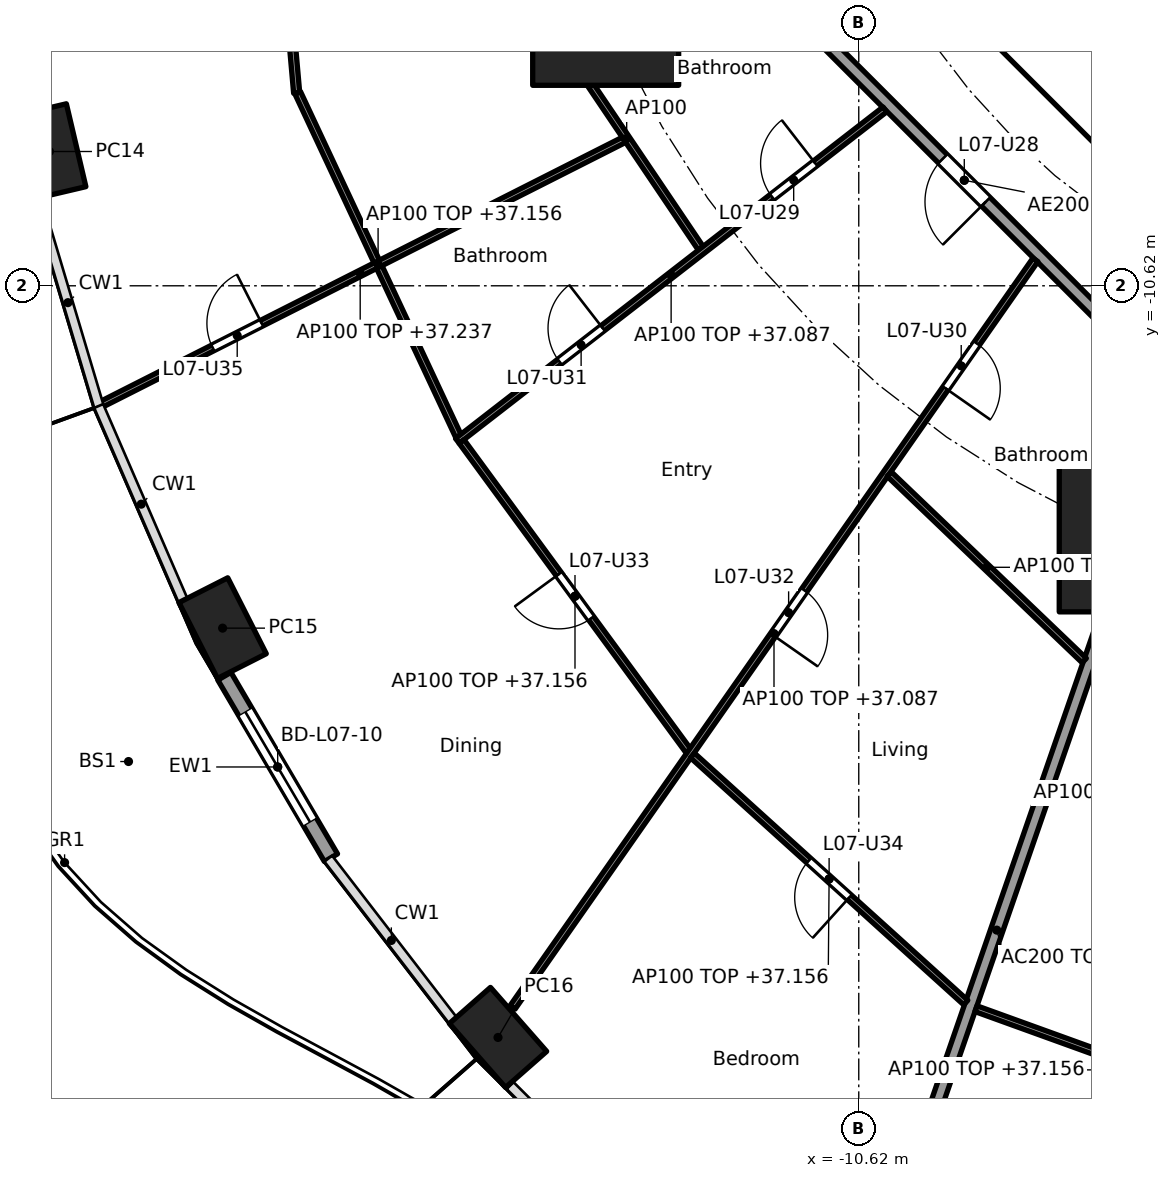
"""IFC4 building model, lengths in metres.
Left out: names, types, materials, properties, quantities, classifications, styles, units other than length and angle.
Written with IfcOpenShell. Run it as: python <this file> out.ifc"""

import sys

from ifc_helpers import new_model, si_unit, direction, frame, frame_2d, origin, origin_2d, place, context, subcontext, project, spatial, rectangle, hollow_rectangle, extrude, element, fill, save


model = new_model("IFC4")
c1 = context("Model", 3, precision=1e-05, world=origin(), true_north=direction((0.0, 1.0)))
c2 = subcontext(c1, "Body", "Model", "MODEL_VIEW")
j1 = project(units=[si_unit("LENGTHUNIT", "METRE"), si_unit("PLANEANGLEUNIT", "RADIAN")], contexts=[c1])
p1 = place(None, origin())
s1 = spatial("IfcSite", under=j1, at=p1, CompositionType="ELEMENT")
p2 = place(p1, origin())
s2 = spatial("IfcBuilding", under=s1, at=p2, CompositionType="ELEMENT")
p3 = place(p2, frame((0.0, 0.0, 34.4)))
s3 = spatial("IfcBuildingStorey", under=s2, at=p3, CompositionType="ELEMENT", Elevation=34.4)
for number, where, z_axis, x_axis in (
    (1, (-23.929, -8.412, 0.0), (0.0, 0.0, 1.0), (0.229, -0.973, 0.0)),
    (2, (-21.082, -16.25, 0.0), (0.0, 0.0, 1.0), (0.452, -0.892, 0.0)),
    (3, (-16.552, -22.981, 0.0), (0.0, 0.0, 1.0), (0.66, -0.751, 0.0)),
):
    element("IfcColumn", number, at=place(p3, frame(where, z_axis=z_axis, x_axis=x_axis)), inside=s3, PredefinedType="COLUMN", context=c2, shape_type="SweptSolid", body=[
        extrude(hollow_rectangle(XDim=1.4, YDim=0.9, WallThickness=0.05, at=origin_2d()), origin(), (0.0, 0.0, 1.0), 3.7),
    ])
for number, where, z_axis, x_axis in (
    (4, (-14.782, -6.123, 0.0), (0.0, 0.0, 1.0), (1.0, 0.0, 0.0)),
    (5, (-6.123, -14.782, 0.0), (0.0, 0.0, 1.0), (1.0, 0.0, 0.0)),
):
    element("IfcColumn", number, at=place(p3, frame(where, z_axis=z_axis, x_axis=x_axis)), inside=s3, PredefinedType="COLUMN", context=c2, shape_type="SweptSolid", body=[
        extrude(rectangle(XDim=2.4, YDim=2.4, at=origin_2d()), origin(), (0.0, 0.0, 1.0), 3.7),
    ])
p4 = place(p3, frame((-19.3, -20.026, 0.0), z_axis=(0.0, 0.0, 1.0), x_axis=(-0.506311160839, 0.862350861546, 0.0)))
e6 = element("IfcWall", 6, at=p4, inside=s3, PredefinedType="SOLIDWALL", context=c2, shape_type="SweptSolid", body=[
    extrude(rectangle(XDim=3.462, YDim=0.25, at=frame_2d((1.731, 0.0))), origin(), (0.0, 0.0, 1.0), 3.44),
])
p5 = place(p4, frame((0.681, 0.0, 0.0)))
e7 = element("IfcOpeningElement", 7, at=p5, cuts=e6, PredefinedType="OPENING", context=c2, shape_type="SweptSolid", body=[
    extrude(rectangle(XDim=2.1, YDim=2.4, at=frame_2d((1.05, 1.2))), frame((0.0, 0.135, 0.0), z_axis=(0.0, -1.0, 0.0), x_axis=(1.0, 0.0, 0.0)), (0.0, 0.0, 1.0), 0.27),
])
p6 = place(p3, frame((-9.988, -4.613, 0.0), z_axis=(0.0, 0.0, 1.0), x_axis=(0.707106781187, -0.707106781187, 0.0)))
e8 = element("IfcWall", 8, at=p6, inside=s3, PredefinedType="SHEAR", context=c2, shape_type="SweptSolid", body=[
    extrude(rectangle(XDim=7.602, YDim=0.6, at=frame_2d((3.801, 0.0))), origin(), (0.0, 0.0, 1.0), 3.44),
])
p7 = place(p6, frame((6.151, 0.0, 0.0)))
e9 = element("IfcOpeningElement", 9, at=p7, cuts=e8, PredefinedType="OPENING", context=c2, shape_type="SweptSolid", body=[
    extrude(rectangle(XDim=1.1, YDim=2.1, at=frame_2d((0.55, 1.05))), frame((0.0, 0.31, 0.0), z_axis=(0.0, -1.0, 0.0), x_axis=(1.0, 0.0, 0.0)), (0.0, 0.0, 1.0), 0.62),
])
p8 = place(p3, frame((-6.139, -14.829, 0.0), z_axis=(0.0, 0.0, 1.0), x_axis=(-0.327178799566, -0.944962450637, 0.0)))
e10 = element("IfcWall", 10, at=p8, inside=s3, PredefinedType="PARTITIONING", context=c2, shape_type="SweptSolid", body=[
    extrude(rectangle(XDim=13.517, YDim=0.2, at=frame_2d((6.759, 0.0))), origin(), (0.0, 0.0, 1.0), 2.756),
])
p9 = place(p3, frame((-12.635, -5.134, 0.0), z_axis=(0.0, 0.0, 1.0), x_axis=(0.707106781187, -0.707106781187, 0.0)))
e11 = element("IfcWall", 11, at=p9, inside=s3, PredefinedType="PARTITIONING", context=c2, shape_type="SweptSolid", body=[
    extrude(rectangle(XDim=10.609, YDim=0.2, at=frame_2d((5.305, 0.0))), origin(), (0.0, 0.0, 1.0), 3.44),
])
p10 = place(p9, frame((4.804, 0.0, 0.0)))
e12 = element("IfcOpeningElement", 12, at=p10, cuts=e11, PredefinedType="OPENING", context=c2, shape_type="SweptSolid", body=[
    extrude(rectangle(XDim=1.0, YDim=2.1, at=frame_2d((0.5, 1.05))), frame((0.0, 0.11, 0.0), z_axis=(0.0, -1.0, 0.0), x_axis=(1.0, 0.0, 0.0)), (0.0, 0.0, 1.0), 0.22),
])
p11 = place(p3, frame((-20.518, -0.05, 0.0), z_axis=(0.0, 0.0, 1.0), x_axis=(0.088138375539, -0.996108240483, 0.0)))
e13 = element("IfcWall", 13, at=p11, inside=s3, PredefinedType="PARTITIONING", context=c2, shape_type="SweptSolid", body=[
    extrude(rectangle(XDim=7.429, YDim=0.1, at=frame_2d((3.714, 0.0))), origin(), (0.0, 0.0, 1.0), 2.756),
])
p12 = place(p11, frame((3.24, 0.0, 0.0)))
e14 = element("IfcOpeningElement", 14, at=p12, cuts=e13, PredefinedType="OPENING", context=c2, shape_type="SweptSolid", body=[
    extrude(rectangle(XDim=0.9, YDim=2.1, at=frame_2d((0.45, 1.05))), frame((0.0, 0.06, 0.0), z_axis=(0.0, -1.0, 0.0), x_axis=(1.0, 0.0, 0.0)), (0.0, 0.0, 1.0), 0.12),
])
p13 = place(p3, frame((-15.655, -6.391, 0.0), z_axis=(0.0, 0.0, 1.0), x_axis=(0.559126445155, -0.82908239538, 0.0)))
e15 = element("IfcWall", 15, at=p13, inside=s3, PredefinedType="PARTITIONING", context=c2, shape_type="SweptSolid", body=[
    extrude(rectangle(XDim=4.358, YDim=0.1, at=frame_2d((2.179, 0.0))), origin(), (0.0, 0.0, 1.0), 3.44),
])
p14 = place(p3, frame((-19.847, -7.445, 0.0), z_axis=(0.0, 0.0, 1.0), x_axis=(0.423892287987, -0.905712607942, 0.0)))
e16 = element("IfcWall", 16, at=p14, inside=s3, PredefinedType="PARTITIONING", context=c2, shape_type="SweptSolid", body=[
    extrude(rectangle(XDim=6.238, YDim=0.1, at=frame_2d((3.119, 0.0))), origin(), (0.0, 0.0, 1.0), 2.756),
])
p15 = place(p3, frame((-14.481, -8.22, 0.0), z_axis=(0.0, 0.0, 1.0), x_axis=(-0.892232077638, -0.451577146935, 0.0)))
e17 = element("IfcWall", 17, at=p15, inside=s3, PredefinedType="PARTITIONING", context=c2, shape_type="SweptSolid", body=[
    extrude(rectangle(XDim=9.723, YDim=0.1, at=frame_2d((4.862, 0.0))), origin(), (0.0, 0.0, 1.0), 2.837),
])
p16 = place(p15, frame((6.678, 0.0, 0.0)))
e18 = element("IfcOpeningElement", 18, at=p16, cuts=e17, PredefinedType="OPENING", context=c2, shape_type="SweptSolid", body=[
    extrude(rectangle(XDim=0.9, YDim=2.1, at=frame_2d((0.45, 1.05))), frame((0.0, 0.06, 0.0), z_axis=(0.0, -1.0, 0.0), x_axis=(1.0, 0.0, 0.0)), (0.0, 0.0, 1.0), 0.12),
])
p17 = place(p3, frame((-10.19, -7.719, 0.0), z_axis=(0.0, 0.0, 1.0), x_axis=(-0.790264549439, -0.612765813259, 0.0)))
e19 = element("IfcWall", 19, at=p17, inside=s3, PredefinedType="PARTITIONING", context=c2, shape_type="SweptSolid", body=[
    extrude(rectangle(XDim=8.896, YDim=0.1, at=frame_2d((4.448, 0.0))), origin(), (0.0, 0.0, 1.0), 2.687),
])
p18 = place(p17, frame((1.448, 0.0, 0.0)))
e20 = element("IfcOpeningElement", 20, at=p18, cuts=e19, PredefinedType="OPENING", context=c2, shape_type="SweptSolid", body=[
    extrude(rectangle(XDim=0.9, YDim=2.1, at=frame_2d((0.45, 1.05))), frame((0.0, 0.06, 0.0), z_axis=(0.0, -1.0, 0.0), x_axis=(1.0, 0.0, 0.0)), (0.0, 0.0, 1.0), 0.12),
])
p19 = place(p17, frame((5.871, 0.0, 0.0)))
e21 = element("IfcOpeningElement", 21, at=p19, cuts=e19, PredefinedType="OPENING", context=c2, shape_type="SweptSolid", body=[
    extrude(rectangle(XDim=0.9, YDim=2.1, at=frame_2d((0.45, 1.05))), frame((0.0, 0.06, 0.0), z_axis=(0.0, -1.0, 0.0), x_axis=(1.0, 0.0, 0.0)), (0.0, 0.0, 1.0), 0.12),
])
p20 = place(p3, frame((-17.152, -13.18, 0.0), z_axis=(0.0, 0.0, 1.0), x_axis=(0.591222750954, -0.806508312886, 0.0)))
e22 = element("IfcWall", 22, at=p20, inside=s3, PredefinedType="PARTITIONING", context=c2, shape_type="SweptSolid", body=[
    extrude(rectangle(XDim=6.31, YDim=0.1, at=frame_2d((3.155, 0.0))), origin(), (0.0, 0.0, 1.0), 2.756),
])
p21 = place(p20, frame((2.705, 0.0, 0.0)))
e23 = element("IfcOpeningElement", 23, at=p21, cuts=e22, PredefinedType="OPENING", context=c2, shape_type="SweptSolid", body=[
    extrude(rectangle(XDim=0.9, YDim=2.1, at=frame_2d((0.45, 1.05))), frame((0.0, 0.06, 0.0), z_axis=(0.0, -1.0, 0.0), x_axis=(1.0, 0.0, 0.0)), (0.0, 0.0, 1.0), 0.12),
])
p22 = place(p3, frame((-7.715, -10.193, 0.0), z_axis=(0.0, 0.0, 1.0), x_axis=(-0.573126964124, -0.819466584428, 0.0)))
e24 = element("IfcWall", 24, at=p22, inside=s3, PredefinedType="PARTITIONING", context=c2, shape_type="SweptSolid", body=[
    extrude(rectangle(XDim=15.001, YDim=0.1, at=frame_2d((7.5, 0.0))), origin(), (0.0, 0.0, 1.0), 2.687),
])
p23 = place(p22, frame((1.678, 0.0, 0.0)))
e25 = element("IfcOpeningElement", 25, at=p23, cuts=e24, PredefinedType="OPENING", context=c2, shape_type="SweptSolid", body=[
    extrude(rectangle(XDim=0.9, YDim=2.1, at=frame_2d((0.45, 1.05))), frame((0.0, 0.06, 0.0), z_axis=(0.0, -1.0, 0.0), x_axis=(1.0, 0.0, 0.0)), (0.0, 0.0, 1.0), 0.12),
])
p24 = place(p22, frame((6.631, 0.0, 0.0)))
e26 = element("IfcOpeningElement", 26, at=p24, cuts=e24, PredefinedType="OPENING", context=c2, shape_type="SweptSolid", body=[
    extrude(rectangle(XDim=0.9, YDim=2.1, at=frame_2d((0.45, 1.05))), frame((0.0, 0.06, 0.0), z_axis=(0.0, -1.0, 0.0), x_axis=(1.0, 0.0, 0.0)), (0.0, 0.0, 1.0), 0.12),
])
p25 = place(p3, frame((-10.119, -13.716, 0.0), z_axis=(0.0, 0.0, 1.0), x_axis=(0.722775679202, -0.691082713975, 0.0)))
e27 = element("IfcWall", 27, at=p25, inside=s3, PredefinedType="PARTITIONING", context=c2, shape_type="SweptSolid", body=[
    extrude(rectangle(XDim=4.437, YDim=0.1, at=frame_2d((2.219, 0.0))), origin(), (0.0, 0.0, 1.0), 2.756),
])
p26 = place(p3, frame((-13.355, -18.343, 0.0), z_axis=(0.0, 0.0, 1.0), x_axis=(0.741713303551, -0.670717060567, 0.0)))
e28 = element("IfcWall", 28, at=p26, inside=s3, PredefinedType="PARTITIONING", context=c2, shape_type="SweptSolid", body=[
    extrude(rectangle(XDim=6.059, YDim=0.1, at=frame_2d((3.03, 0.0))), origin(), (0.0, 0.0, 1.0), 2.756),
])
p27 = place(p26, frame((2.58, 0.0, 0.0)))
e29 = element("IfcOpeningElement", 29, at=p27, cuts=e28, PredefinedType="OPENING", context=c2, shape_type="SweptSolid", body=[
    extrude(rectangle(XDim=0.9, YDim=2.1, at=frame_2d((0.45, 1.05))), frame((0.0, 0.06, 0.0), z_axis=(0.0, -1.0, 0.0), x_axis=(1.0, 0.0, 0.0)), (0.0, 0.0, 1.0), 0.12),
])
p28 = place(p3, frame((-8.692, -22.508, 0.0), z_axis=(0.0, 0.0, 1.0), x_axis=(0.940401494588, -0.340066212636, 0.0)))
e30 = element("IfcWall", 30, at=p28, inside=s3, PredefinedType="PARTITIONING", context=c2, shape_type="SweptSolid", body=[
    extrude(rectangle(XDim=5.917, YDim=0.1, at=frame_2d((2.958, 0.0))), origin(), (0.0, 0.0, 1.0), 2.756),
])
p29 = place(p28, frame((2.509, 0.0, 0.0)))
e31 = element("IfcOpeningElement", 31, at=p29, cuts=e30, PredefinedType="OPENING", context=c2, shape_type="SweptSolid", body=[
    extrude(rectangle(XDim=0.9, YDim=2.1, at=frame_2d((0.45, 1.05))), frame((0.0, 0.06, 0.0), z_axis=(0.0, -1.0, 0.0), x_axis=(1.0, 0.0, 0.0)), (0.0, 0.0, 1.0), 0.12),
])
p30 = place(p5, origin())
e32 = element("IfcDoor", 32, at=p30, inside=s3, OperationType="SLIDING_TO_LEFT", PredefinedType="DOOR", context=c2, shape_type="SweptSolid", body=[
    extrude(rectangle(XDim=2.1, YDim=2.4, at=frame_2d((1.05, 1.2))), frame((0.0, 0.025, 0.0), z_axis=(0.0, -1.0, 0.0), x_axis=(1.0, 0.0, 0.0)), (0.0, 0.0, 1.0), 0.05),
])
fill(e7, e32)
p31 = place(p10, frame((1.0, 0.0, 0.0), x_axis=(-1.0, 0.0, 0.0)))
e33 = element("IfcDoor", 33, at=p31, inside=s3, OperationType="SINGLE_SWING_LEFT", PredefinedType="DOOR", context=c2, shape_type="SweptSolid", body=[
    extrude(rectangle(XDim=1.0, YDim=2.1, at=frame_2d((0.5, 1.05))), frame((0.0, 0.025, 0.0), z_axis=(0.0, -1.0, 0.0), x_axis=(1.0, 0.0, 0.0)), (0.0, 0.0, 1.0), 0.05),
])
fill(e12, e33)
p32 = place(p18, frame((0.9, 0.0, 0.0), x_axis=(-1.0, 0.0, 0.0)))
e34 = element("IfcDoor", 34, at=p32, inside=s3, OperationType="SINGLE_SWING_RIGHT", PredefinedType="DOOR", context=c2, shape_type="SweptSolid", body=[
    extrude(rectangle(XDim=0.9, YDim=2.1, at=frame_2d((0.45, 1.05))), frame((0.0, 0.025, 0.0), z_axis=(0.0, -1.0, 0.0), x_axis=(1.0, 0.0, 0.0)), (0.0, 0.0, 1.0), 0.05),
])
fill(e20, e34)
p33 = place(p23, origin())
e35 = element("IfcDoor", 35, at=p33, inside=s3, OperationType="SINGLE_SWING_RIGHT", PredefinedType="DOOR", context=c2, shape_type="SweptSolid", body=[
    extrude(rectangle(XDim=0.9, YDim=2.1, at=frame_2d((0.45, 1.05))), frame((0.0, 0.025, 0.0), z_axis=(0.0, -1.0, 0.0), x_axis=(1.0, 0.0, 0.0)), (0.0, 0.0, 1.0), 0.05),
])
fill(e25, e35)
p34 = place(p19, frame((0.9, 0.0, 0.0), x_axis=(-1.0, 0.0, 0.0)))
e36 = element("IfcDoor", 36, at=p34, inside=s3, OperationType="SINGLE_SWING_RIGHT", PredefinedType="DOOR", context=c2, shape_type="SweptSolid", body=[
    extrude(rectangle(XDim=0.9, YDim=2.1, at=frame_2d((0.45, 1.05))), frame((0.0, 0.025, 0.0), z_axis=(0.0, -1.0, 0.0), x_axis=(1.0, 0.0, 0.0)), (0.0, 0.0, 1.0), 0.05),
])
fill(e21, e36)
p35 = place(p24, origin())
e37 = element("IfcDoor", 37, at=p35, inside=s3, OperationType="SINGLE_SWING_RIGHT", PredefinedType="DOOR", context=c2, shape_type="SweptSolid", body=[
    extrude(rectangle(XDim=0.9, YDim=2.1, at=frame_2d((0.45, 1.05))), frame((0.0, 0.025, 0.0), z_axis=(0.0, -1.0, 0.0), x_axis=(1.0, 0.0, 0.0)), (0.0, 0.0, 1.0), 0.05),
])
fill(e26, e37)
p36 = place(p21, frame((0.9, 0.0, 0.0), x_axis=(-1.0, 0.0, 0.0)))
e38 = element("IfcDoor", 38, at=p36, inside=s3, OperationType="SINGLE_SWING_RIGHT", PredefinedType="DOOR", context=c2, shape_type="SweptSolid", body=[
    extrude(rectangle(XDim=0.9, YDim=2.1, at=frame_2d((0.45, 1.05))), frame((0.0, 0.025, 0.0), z_axis=(0.0, -1.0, 0.0), x_axis=(1.0, 0.0, 0.0)), (0.0, 0.0, 1.0), 0.05),
])
fill(e23, e38)
p37 = place(p27, frame((0.9, 0.0, 0.0), x_axis=(-1.0, 0.0, 0.0)))
e39 = element("IfcDoor", 39, at=p37, inside=s3, OperationType="SINGLE_SWING_LEFT", PredefinedType="DOOR", context=c2, shape_type="SweptSolid", body=[
    extrude(rectangle(XDim=0.9, YDim=2.1, at=frame_2d((0.45, 1.05))), frame((0.0, 0.025, 0.0), z_axis=(0.0, -1.0, 0.0), x_axis=(1.0, 0.0, 0.0)), (0.0, 0.0, 1.0), 0.05),
])
fill(e29, e39)
p38 = place(p16, frame((0.9, 0.0, 0.0), x_axis=(-1.0, 0.0, 0.0)))
e40 = element("IfcDoor", 40, at=p38, inside=s3, OperationType="SINGLE_SWING_RIGHT", PredefinedType="DOOR", context=c2, shape_type="SweptSolid", body=[
    extrude(rectangle(XDim=0.9, YDim=2.1, at=frame_2d((0.45, 1.05))), frame((0.0, 0.025, 0.0), z_axis=(0.0, -1.0, 0.0), x_axis=(1.0, 0.0, 0.0)), (0.0, 0.0, 1.0), 0.05),
])
fill(e18, e40)
save(model, sys.argv[1])
